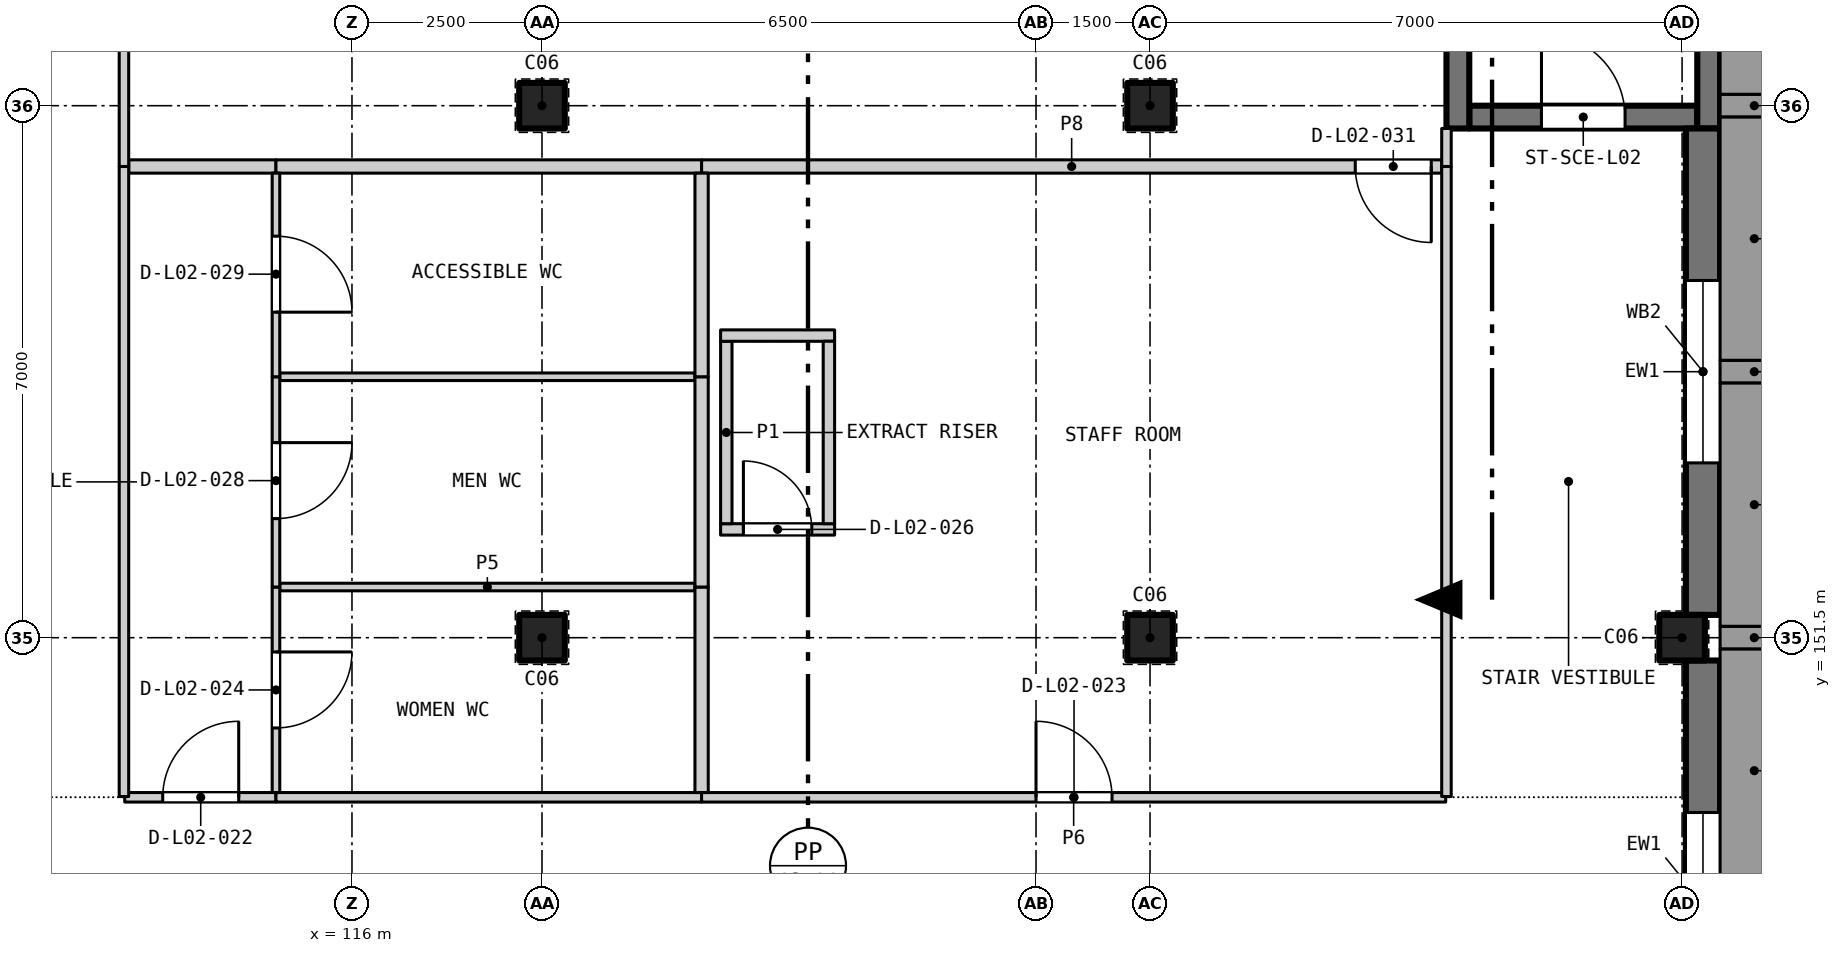
"""IFC4 building model, lengths in metres.
Left out: names, types, materials, properties, quantities, classifications, styles, units other than length and angle.
Written with IfcOpenShell. Run it as: python <this file> out.ifc"""

import sys

from ifc_helpers import new_model, si_unit, direction, frame, frame_2d, origin, origin_2d, place, context, subcontext, project, spatial, rectangle, extrude, element, fill, save


model = new_model("IFC4")
c1 = context("Model", 3, precision=1e-05, world=origin(), true_north=direction((0.0, 1.0)))
c2 = subcontext(c1, "Body", "Model", "MODEL_VIEW")
j1 = project(units=[si_unit("LENGTHUNIT", "METRE"), si_unit("PLANEANGLEUNIT", "RADIAN")], contexts=[c1])
p1 = place(None, origin())
s1 = spatial("IfcSite", under=j1, at=p1, CompositionType="ELEMENT")
p2 = place(p1, origin())
s2 = spatial("IfcBuilding", under=s1, at=p2, CompositionType="ELEMENT")
p3 = place(p2, frame((0.0, 0.0, 10.2)))
s3 = spatial("IfcBuildingStorey", under=s2, at=p3, CompositionType="ELEMENT", Elevation=10.2)
for number, where, z_axis, x_axis in (
    (1, (118.5, 151.5, 0.0), (0.0, 0.0, 1.0), (1.0, 0.0, 0.0)),
    (2, (118.5, 158.5, 0.0), (0.0, 0.0, 1.0), (1.0, 0.0, 0.0)),
    (3, (126.5, 151.5, 0.0), (0.0, 0.0, 1.0), (1.0, 0.0, 0.0)),
    (4, (126.5, 158.5, 0.0), (0.0, 0.0, 1.0), (1.0, 0.0, 0.0)),
    (5, (133.5, 151.5, 0.0), (0.0, 0.0, 1.0), (1.0, 0.0, 0.0)),
):
    element("IfcColumn", number, at=place(p3, frame(where, z_axis=z_axis, x_axis=x_axis)), inside=s3, PredefinedType="COLUMN", context=c2, shape_type="SweptSolid", body=[
        extrude(rectangle(XDim=0.6, YDim=0.6, at=origin_2d()), origin(), (0.0, 0.0, 1.0), 4.2),
    ])
p4 = place(p3, frame((130.7, 158.35, 0.0), z_axis=(0.0, 0.0, 1.0), x_axis=(1.0, 0.0, 0.0)))
e6 = element("IfcWall", 6, at=p4, inside=s3, PredefinedType="SHEAR", context=c2, shape_type="SweptSolid", body=[
    extrude(rectangle(XDim=3.0, YDim=0.3, at=frame_2d((1.5, 0.0))), origin(), (0.0, 0.0, 1.0), 4.2),
])
p5 = place(p4, frame((0.95, 0.0, 0.0)))
e7 = element("IfcOpeningElement", 7, at=p5, cuts=e6, PredefinedType="OPENING", context=c2, shape_type="SweptSolid", body=[
    extrude(rectangle(XDim=1.1, YDim=2.1, at=frame_2d((0.55, 1.05))), frame((0.0, 0.16, 0.0), z_axis=(0.0, -1.0, 0.0), x_axis=(1.0, 0.0, 0.0)), (0.0, 0.0, 1.0), 0.32),
])
p6 = place(p3, frame((130.55, 158.2, 0.0), z_axis=(0.0, 0.0, 1.0), x_axis=(0.0, 1.0, 0.0)))
e8 = element("IfcWall", 8, at=p6, inside=s3, PredefinedType="SHEAR", context=c2, shape_type="SweptSolid", body=[
    extrude(rectangle(XDim=7.5, YDim=0.3, at=frame_2d((3.75, 0.0))), origin(), (0.0, 0.0, 1.0), 4.2),
])
p7 = place(p3, frame((133.85, 165.7, 0.0), z_axis=(0.0, 0.0, 1.0), x_axis=(0.0, -1.0, 0.0)))
e9 = element("IfcWall", 9, at=p7, inside=s3, PredefinedType="SOLIDWALL", context=c2, shape_type="SweptSolid", body=[
    extrude(rectangle(XDim=7.5, YDim=0.3, at=frame_2d((3.75, 0.0))), origin(), (0.0, 0.0, 1.0), 3.9),
])
p8 = place(p3, frame((133.775, 151.2, 0.0), z_axis=(0.0, 0.0, 1.0), x_axis=(0.0, -1.0, 0.0)))
e10 = element("IfcWall", 10, at=p8, inside=s3, PredefinedType="SOLIDWALL", context=c2, shape_type="SweptSolid", body=[
    extrude(rectangle(XDim=6.4, YDim=0.45, at=frame_2d((3.2, 0.0))), origin(), (0.0, 0.0, 1.0), 3.2),
])
p9 = place(p8, frame((2.0, 0.0, 0.9)))
e11 = element("IfcOpeningElement", 11, at=p9, cuts=e10, PredefinedType="OPENING", context=c2, shape_type="SweptSolid", body=[
    extrude(rectangle(XDim=2.4, YDim=1.6, at=frame_2d((1.2, 0.8))), frame((0.0, 0.235, 0.0), z_axis=(0.0, -1.0, 0.0), x_axis=(1.0, 0.0, 0.0)), (0.0, 0.0, 1.0), 0.47),
])
p10 = place(p3, frame((133.775, 158.2, 0.0), z_axis=(0.0, 0.0, 1.0), x_axis=(0.0, -1.0, 0.0)))
e12 = element("IfcWall", 12, at=p10, inside=s3, PredefinedType="SOLIDWALL", context=c2, shape_type="SweptSolid", body=[
    extrude(rectangle(XDim=6.4, YDim=0.45, at=frame_2d((3.2, 0.0))), origin(), (0.0, 0.0, 1.0), 3.2),
])
p11 = place(p10, frame((2.0, 0.0, 0.9)))
e13 = element("IfcOpeningElement", 13, at=p11, cuts=e12, PredefinedType="OPENING", context=c2, shape_type="SweptSolid", body=[
    extrude(rectangle(XDim=2.4, YDim=1.6, at=frame_2d((1.2, 0.8))), frame((0.0, 0.235, 0.0), z_axis=(0.0, -1.0, 0.0), x_axis=(1.0, 0.0, 0.0)), (0.0, 0.0, 1.0), 0.47),
])
p12 = place(p3, frame((120.85, 152.925, 0.0), z_axis=(0.0, 0.0, 1.0), x_axis=(1.0, 0.0, 0.0)))
e14 = element("IfcWall", 14, at=p12, inside=s3, PredefinedType="PARTITIONING", context=c2, shape_type="SweptSolid", body=[
    extrude(rectangle(XDim=1.5, YDim=0.15, at=frame_2d((0.75, 0.0))), origin(), (0.0, 0.0, 1.0), 3.9),
])
p13 = place(p12, frame((0.3, 0.0, 0.0)))
e15 = element("IfcOpeningElement", 15, at=p13, cuts=e14, PredefinedType="OPENING", context=c2, shape_type="SweptSolid", body=[
    extrude(rectangle(XDim=0.9, YDim=2.1, at=frame_2d((0.45, 1.05))), frame((0.0, 0.085, 0.0), z_axis=(0.0, -1.0, 0.0), x_axis=(1.0, 0.0, 0.0)), (0.0, 0.0, 1.0), 0.17),
])
p14 = place(p3, frame((120.925, 153.0, 0.0), z_axis=(0.0, 0.0, 1.0), x_axis=(0.0, 1.0, 0.0)))
e16 = element("IfcWall", 16, at=p14, inside=s3, PredefinedType="PARTITIONING", context=c2, shape_type="SweptSolid", body=[
    extrude(rectangle(XDim=2.4, YDim=0.15, at=frame_2d((1.2, 0.0))), origin(), (0.0, 0.0, 1.0), 3.9),
])
p15 = place(p3, frame((120.85, 155.475, 0.0), z_axis=(0.0, 0.0, 1.0), x_axis=(1.0, 0.0, 0.0)))
e17 = element("IfcWall", 17, at=p15, inside=s3, PredefinedType="PARTITIONING", context=c2, shape_type="SweptSolid", body=[
    extrude(rectangle(XDim=1.5, YDim=0.15, at=frame_2d((0.75, 0.0))), origin(), (0.0, 0.0, 1.0), 3.9),
])
p16 = place(p3, frame((122.275, 153.0, 0.0), z_axis=(0.0, 0.0, 1.0), x_axis=(0.0, 1.0, 0.0)))
e18 = element("IfcWall", 18, at=p16, inside=s3, PredefinedType="PARTITIONING", context=c2, shape_type="SweptSolid", body=[
    extrude(rectangle(XDim=2.4, YDim=0.15, at=frame_2d((1.2, 0.0))), origin(), (0.0, 0.0, 1.0), 3.9),
])
p17 = place(p3, frame((113.01, 149.4, 0.0), z_axis=(0.0, 0.0, 1.0), x_axis=(1.0, 0.0, 0.0)))
e19 = element("IfcWall", 19, at=p17, inside=s3, PredefinedType="PARTITIONING", context=c2, shape_type="SweptSolid", body=[
    extrude(rectangle(XDim=1.99, YDim=0.125, at=frame_2d((0.995, 0.0))), origin(), (0.0, 0.0, 1.0), 3.9),
])
p18 = place(p17, frame((0.5, 0.0, 0.0)))
e20 = element("IfcOpeningElement", 20, at=p18, cuts=e19, PredefinedType="OPENING", context=c2, shape_type="SweptSolid", body=[
    extrude(rectangle(XDim=1.0, YDim=2.1, at=frame_2d((0.5, 1.05))), frame((0.0, 0.073, 0.0), z_axis=(0.0, -1.0, 0.0), x_axis=(1.0, 0.0, 0.0)), (0.0, 0.0, 1.0), 0.145),
])
p19 = place(p3, frame((115.0, 149.4, 0.0), z_axis=(0.0, 0.0, 1.0), x_axis=(1.0, 0.0, 0.0)))
e21 = element("IfcWall", 21, at=p19, inside=s3, PredefinedType="PARTITIONING", context=c2, shape_type="SweptSolid", body=[
    extrude(rectangle(XDim=5.6, YDim=0.125, at=frame_2d((2.8, 0.0))), origin(), (0.0, 0.0, 1.0), 3.9),
])
p20 = place(p3, frame((120.6, 149.4, 0.0), z_axis=(0.0, 0.0, 1.0), x_axis=(1.0, 0.0, 0.0)))
e22 = element("IfcWall", 22, at=p20, inside=s3, PredefinedType="PARTITIONING", context=c2, shape_type="SweptSolid", body=[
    extrude(rectangle(XDim=9.79, YDim=0.125, at=frame_2d((4.895, 0.0))), origin(), (0.0, 0.0, 1.0), 3.9),
])
p21 = place(p20, frame((4.4, 0.0, 0.0)))
e23 = element("IfcOpeningElement", 23, at=p21, cuts=e22, PredefinedType="OPENING", context=c2, shape_type="SweptSolid", body=[
    extrude(rectangle(XDim=1.0, YDim=2.1, at=frame_2d((0.5, 1.05))), frame((0.0, 0.073, 0.0), z_axis=(0.0, -1.0, 0.0), x_axis=(1.0, 0.0, 0.0)), (0.0, 0.0, 1.0), 0.145),
])
for number, where, z_axis, x_axis in (
    (24, (115.05, 152.167, 0.0), (0.0, 0.0, 1.0), (1.0, 0.0, 0.0)),
    (25, (115.05, 154.933, 0.0), (0.0, 0.0, 1.0), (1.0, 0.0, 0.0)),
):
    element("IfcWall", number, at=place(p3, frame(where, z_axis=z_axis, x_axis=x_axis)), inside=s3, PredefinedType="PARTITIONING", context=c2, shape_type="SweptSolid", body=[
        extrude(rectangle(XDim=5.462, YDim=0.1, at=frame_2d((2.731, 0.0))), origin(), (0.0, 0.0, 1.0), 3.9),
    ])
p22 = place(p3, frame((113.062, 157.7, 0.0), z_axis=(0.0, 0.0, 1.0), x_axis=(1.0, 0.0, 0.0)))
e26 = element("IfcWall", 26, at=p22, inside=s3, PredefinedType="PARTITIONING", context=c2, shape_type="SweptSolid", body=[
    extrude(rectangle(XDim=1.938, YDim=0.175, at=frame_2d((0.969, 0.0))), origin(), (0.0, 0.0, 1.0), 3.9),
])
p23 = place(p3, frame((115.0, 157.7, 0.0), z_axis=(0.0, 0.0, 1.0), x_axis=(1.0, 0.0, 0.0)))
e27 = element("IfcWall", 27, at=p23, inside=s3, PredefinedType="PARTITIONING", context=c2, shape_type="SweptSolid", body=[
    extrude(rectangle(XDim=5.6, YDim=0.175, at=frame_2d((2.8, 0.0))), origin(), (0.0, 0.0, 1.0), 3.9),
])
p24 = place(p3, frame((120.6, 157.7, 0.0), z_axis=(0.0, 0.0, 1.0), x_axis=(1.0, 0.0, 0.0)))
e28 = element("IfcWall", 28, at=p24, inside=s3, PredefinedType="PARTITIONING", context=c2, shape_type="SweptSolid", body=[
    extrude(rectangle(XDim=9.737, YDim=0.175, at=frame_2d((4.869, 0.0))), origin(), (0.0, 0.0, 1.0), 3.9),
])
p25 = place(p24, frame((8.6, 0.0, 0.0)))
e29 = element("IfcOpeningElement", 29, at=p25, cuts=e28, PredefinedType="OPENING", context=c2, shape_type="SweptSolid", body=[
    extrude(rectangle(XDim=1.0, YDim=2.1, at=frame_2d((0.5, 1.05))), frame((0.0, 0.097, 0.0), z_axis=(0.0, -1.0, 0.0), x_axis=(1.0, 0.0, 0.0)), (0.0, 0.0, 1.0), 0.195),
])
p26 = place(p3, frame((113.0, 149.41, 0.0), z_axis=(0.0, 0.0, 1.0), x_axis=(0.0, 1.0, 0.0)))
e30 = element("IfcWall", 30, at=p26, inside=s3, PredefinedType="PARTITIONING", context=c2, shape_type="SweptSolid", body=[
    extrude(rectangle(XDim=8.29, YDim=0.125, at=frame_2d((4.145, 0.0))), origin(), (0.0, 0.0, 1.0), 3.9),
])
p27 = place(p3, frame((113.0, 157.7, 0.0), z_axis=(0.0, 0.0, 1.0), x_axis=(0.0, 1.0, 0.0)))
e31 = element("IfcWall", 31, at=p27, inside=s3, PredefinedType="PARTITIONING", context=c2, shape_type="SweptSolid", body=[
    extrude(rectangle(XDim=8.15, YDim=0.125, at=frame_2d((4.075, 0.0))), origin(), (0.0, 0.0, 1.0), 3.9),
])
p28 = place(p27, frame((3.6, 0.0, 0.0)))
e32 = element("IfcOpeningElement", 32, at=p28, cuts=e31, PredefinedType="OPENING", context=c2, shape_type="SweptSolid", body=[
    extrude(rectangle(XDim=1.0, YDim=2.1, at=frame_2d((0.5, 1.05))), frame((0.0, 0.073, 0.0), z_axis=(0.0, -1.0, 0.0), x_axis=(1.0, 0.0, 0.0)), (0.0, 0.0, 1.0), 0.145),
])
p29 = place(p3, frame((115.0, 149.462, 0.0), z_axis=(0.0, 0.0, 1.0), x_axis=(0.0, 1.0, 0.0)))
e33 = element("IfcWall", 33, at=p29, inside=s3, PredefinedType="PARTITIONING", context=c2, shape_type="SweptSolid", body=[
    extrude(rectangle(XDim=2.704, YDim=0.1, at=frame_2d((1.352, 0.0))), origin(), (0.0, 0.0, 1.0), 3.9),
])
p30 = place(p29, frame((0.85, 0.0, 0.0)))
e34 = element("IfcOpeningElement", 34, at=p30, cuts=e33, PredefinedType="OPENING", context=c2, shape_type="SweptSolid", body=[
    extrude(rectangle(XDim=1.0, YDim=2.1, at=frame_2d((0.5, 1.05))), frame((0.0, 0.06, 0.0), z_axis=(0.0, -1.0, 0.0), x_axis=(1.0, 0.0, 0.0)), (0.0, 0.0, 1.0), 0.12),
])
p31 = place(p3, frame((115.0, 152.167, 0.0), z_axis=(0.0, 0.0, 1.0), x_axis=(0.0, 1.0, 0.0)))
e35 = element("IfcWall", 35, at=p31, inside=s3, PredefinedType="PARTITIONING", context=c2, shape_type="SweptSolid", body=[
    extrude(rectangle(XDim=2.767, YDim=0.1, at=frame_2d((1.383, 0.0))), origin(), (0.0, 0.0, 1.0), 3.9),
])
p32 = place(p31, frame((0.9, 0.0, 0.0)))
e36 = element("IfcOpeningElement", 36, at=p32, cuts=e35, PredefinedType="OPENING", context=c2, shape_type="SweptSolid", body=[
    extrude(rectangle(XDim=1.0, YDim=2.1, at=frame_2d((0.5, 1.05))), frame((0.0, 0.06, 0.0), z_axis=(0.0, -1.0, 0.0), x_axis=(1.0, 0.0, 0.0)), (0.0, 0.0, 1.0), 0.12),
])
p33 = place(p3, frame((115.0, 154.933, 0.0), z_axis=(0.0, 0.0, 1.0), x_axis=(0.0, 1.0, 0.0)))
e37 = element("IfcWall", 37, at=p33, inside=s3, PredefinedType="PARTITIONING", context=c2, shape_type="SweptSolid", body=[
    extrude(rectangle(XDim=2.679, YDim=0.1, at=frame_2d((1.34, 0.0))), origin(), (0.0, 0.0, 1.0), 3.9),
])
p34 = place(p33, frame((0.85, 0.0, 0.0)))
e38 = element("IfcOpeningElement", 38, at=p34, cuts=e37, PredefinedType="OPENING", context=c2, shape_type="SweptSolid", body=[
    extrude(rectangle(XDim=1.0, YDim=2.1, at=frame_2d((0.5, 1.05))), frame((0.0, 0.06, 0.0), z_axis=(0.0, -1.0, 0.0), x_axis=(1.0, 0.0, 0.0)), (0.0, 0.0, 1.0), 0.12),
])
p35 = place(p3, frame((120.6, 149.462, 0.0), z_axis=(0.0, 0.0, 1.0), x_axis=(0.0, 1.0, 0.0)))
e39 = element("IfcWall", 39, at=p35, inside=s3, PredefinedType="PARTITIONING", context=c2, shape_type="SweptSolid", body=[
    extrude(rectangle(XDim=2.704, YDim=0.175, at=frame_2d((1.352, 0.0))), origin(), (0.0, 0.0, 1.0), 3.9),
])
p36 = place(p3, frame((120.6, 152.167, 0.0), z_axis=(0.0, 0.0, 1.0), x_axis=(0.0, 1.0, 0.0)))
e40 = element("IfcWall", 40, at=p36, inside=s3, PredefinedType="PARTITIONING", context=c2, shape_type="SweptSolid", body=[
    extrude(rectangle(XDim=2.767, YDim=0.175, at=frame_2d((1.383, 0.0))), origin(), (0.0, 0.0, 1.0), 3.9),
])
p37 = place(p3, frame((120.6, 154.933, 0.0), z_axis=(0.0, 0.0, 1.0), x_axis=(0.0, 1.0, 0.0)))
e41 = element("IfcWall", 41, at=p37, inside=s3, PredefinedType="PARTITIONING", context=c2, shape_type="SweptSolid", body=[
    extrude(rectangle(XDim=2.679, YDim=0.175, at=frame_2d((1.34, 0.0))), origin(), (0.0, 0.0, 1.0), 3.9),
])
p38 = place(p3, frame((130.4, 149.41, 0.0), z_axis=(0.0, 0.0, 1.0), x_axis=(0.0, 1.0, 0.0)))
e42 = element("IfcWall", 42, at=p38, inside=s3, PredefinedType="PARTITIONING", context=c2, shape_type="SweptSolid", body=[
    extrude(rectangle(XDim=8.29, YDim=0.125, at=frame_2d((4.145, 0.0))), origin(), (0.0, 0.0, 1.0), 3.9),
])
p39 = place(p3, frame((130.4, 157.7, 0.0), z_axis=(0.0, 0.0, 1.0), x_axis=(0.0, 1.0, 0.0)))
e43 = element("IfcWall", 43, at=p39, inside=s3, PredefinedType="PARTITIONING", context=c2, shape_type="SweptSolid", body=[
    extrude(rectangle(XDim=0.5, YDim=0.125, at=frame_2d((0.25, 0.0))), origin(), (0.0, 0.0, 1.0), 3.9),
])
p40 = place(p9, origin())
e44 = element("IfcWindow", 44, at=p40, inside=s3, PartitioningType="SINGLE_PANEL", PredefinedType="WINDOW", context=c2, shape_type="SweptSolid", body=[
    extrude(rectangle(XDim=2.4, YDim=1.6, at=frame_2d((1.2, 0.8))), frame((0.0, -0.125, 0.0), z_axis=(0.0, -1.0, 0.0), x_axis=(1.0, 0.0, 0.0)), (0.0, 0.0, 1.0), 0.06),
])
fill(e11, e44)
p41 = place(p11, origin())
e45 = element("IfcWindow", 45, at=p41, inside=s3, PartitioningType="SINGLE_PANEL", PredefinedType="WINDOW", context=c2, shape_type="SweptSolid", body=[
    extrude(rectangle(XDim=2.4, YDim=1.6, at=frame_2d((1.2, 0.8))), frame((0.0, -0.125, 0.0), z_axis=(0.0, -1.0, 0.0), x_axis=(1.0, 0.0, 0.0)), (0.0, 0.0, 1.0), 0.06),
])
fill(e13, e45)
p42 = place(p18, origin())
e46 = element("IfcDoor", 46, at=p42, inside=s3, OperationType="SINGLE_SWING_RIGHT", PredefinedType="DOOR", context=c2, shape_type="SweptSolid", body=[
    extrude(rectangle(XDim=1.0, YDim=2.1, at=frame_2d((0.5, 1.05))), frame((0.0, 0.025, 0.0), z_axis=(0.0, -1.0, 0.0), x_axis=(1.0, 0.0, 0.0)), (0.0, 0.0, 1.0), 0.05),
])
fill(e20, e46)
p43 = place(p21, origin())
e47 = element("IfcDoor", 47, at=p43, inside=s3, OperationType="SINGLE_SWING_LEFT", PredefinedType="DOOR", context=c2, shape_type="SweptSolid", body=[
    extrude(rectangle(XDim=1.0, YDim=2.1, at=frame_2d((0.5, 1.05))), frame((0.0, 0.025, 0.0), z_axis=(0.0, -1.0, 0.0), x_axis=(1.0, 0.0, 0.0)), (0.0, 0.0, 1.0), 0.05),
])
fill(e23, e47)
p44 = place(p30, frame((1.0, 0.0, 0.0), z_axis=(0.0, 0.0, 1.0), x_axis=(-1.0, 0.0, 0.0)))
e48 = element("IfcDoor", 48, at=p44, inside=s3, OperationType="SINGLE_SWING_LEFT", PredefinedType="DOOR", context=c2, shape_type="SweptSolid", body=[
    extrude(rectangle(XDim=1.0, YDim=2.1, at=frame_2d((0.5, 1.05))), frame((0.0, 0.025, 0.0), z_axis=(0.0, -1.0, 0.0), x_axis=(1.0, 0.0, 0.0)), (0.0, 0.0, 1.0), 0.05),
])
fill(e34, e48)
p45 = place(p13, origin())
e49 = element("IfcDoor", 49, at=p45, inside=s3, OperationType="SINGLE_SWING_LEFT", PredefinedType="DOOR", context=c2, shape_type="SweptSolid", body=[
    extrude(rectangle(XDim=0.9, YDim=2.1, at=frame_2d((0.45, 1.05))), frame((0.0, 0.025, 0.0), z_axis=(0.0, -1.0, 0.0), x_axis=(1.0, 0.0, 0.0)), (0.0, 0.0, 1.0), 0.05),
])
fill(e15, e49)
p46 = place(p32, frame((1.0, 0.0, 0.0), z_axis=(0.0, 0.0, 1.0), x_axis=(-1.0, 0.0, 0.0)))
e50 = element("IfcDoor", 50, at=p46, inside=s3, OperationType="SINGLE_SWING_LEFT", PredefinedType="DOOR", context=c2, shape_type="SweptSolid", body=[
    extrude(rectangle(XDim=1.0, YDim=2.1, at=frame_2d((0.5, 1.05))), frame((0.0, 0.025, 0.0), z_axis=(0.0, -1.0, 0.0), x_axis=(1.0, 0.0, 0.0)), (0.0, 0.0, 1.0), 0.05),
])
fill(e36, e50)
p47 = place(p34, frame((1.0, 0.0, 0.0), z_axis=(0.0, 0.0, 1.0), x_axis=(-1.0, 0.0, 0.0)))
e51 = element("IfcDoor", 51, at=p47, inside=s3, OperationType="SINGLE_SWING_RIGHT", PredefinedType="DOOR", context=c2, shape_type="SweptSolid", body=[
    extrude(rectangle(XDim=1.0, YDim=2.1, at=frame_2d((0.5, 1.05))), frame((0.0, 0.025, 0.0), z_axis=(0.0, -1.0, 0.0), x_axis=(1.0, 0.0, 0.0)), (0.0, 0.0, 1.0), 0.05),
])
fill(e38, e51)
p48 = place(p25, frame((1.0, 0.0, 0.0), z_axis=(0.0, 0.0, 1.0), x_axis=(-1.0, 0.0, 0.0)))
e52 = element("IfcDoor", 52, at=p48, inside=s3, OperationType="SINGLE_SWING_LEFT", PredefinedType="DOOR", context=c2, shape_type="SweptSolid", body=[
    extrude(rectangle(XDim=1.0, YDim=2.1, at=frame_2d((0.5, 1.05))), frame((0.0, 0.025, 0.0), z_axis=(0.0, -1.0, 0.0), x_axis=(1.0, 0.0, 0.0)), (0.0, 0.0, 1.0), 0.05),
])
fill(e29, e52)
p49 = place(p5, origin())
e53 = element("IfcDoor", 53, at=p49, inside=s3, OperationType="SINGLE_SWING_LEFT", PredefinedType="DOOR", context=c2, shape_type="SweptSolid", body=[
    extrude(rectangle(XDim=1.1, YDim=2.1, at=frame_2d((0.55, 1.05))), frame((0.0, 0.025, 0.0), z_axis=(0.0, -1.0, 0.0), x_axis=(1.0, 0.0, 0.0)), (0.0, 0.0, 1.0), 0.05),
])
fill(e7, e53)
save(model, sys.argv[1])
